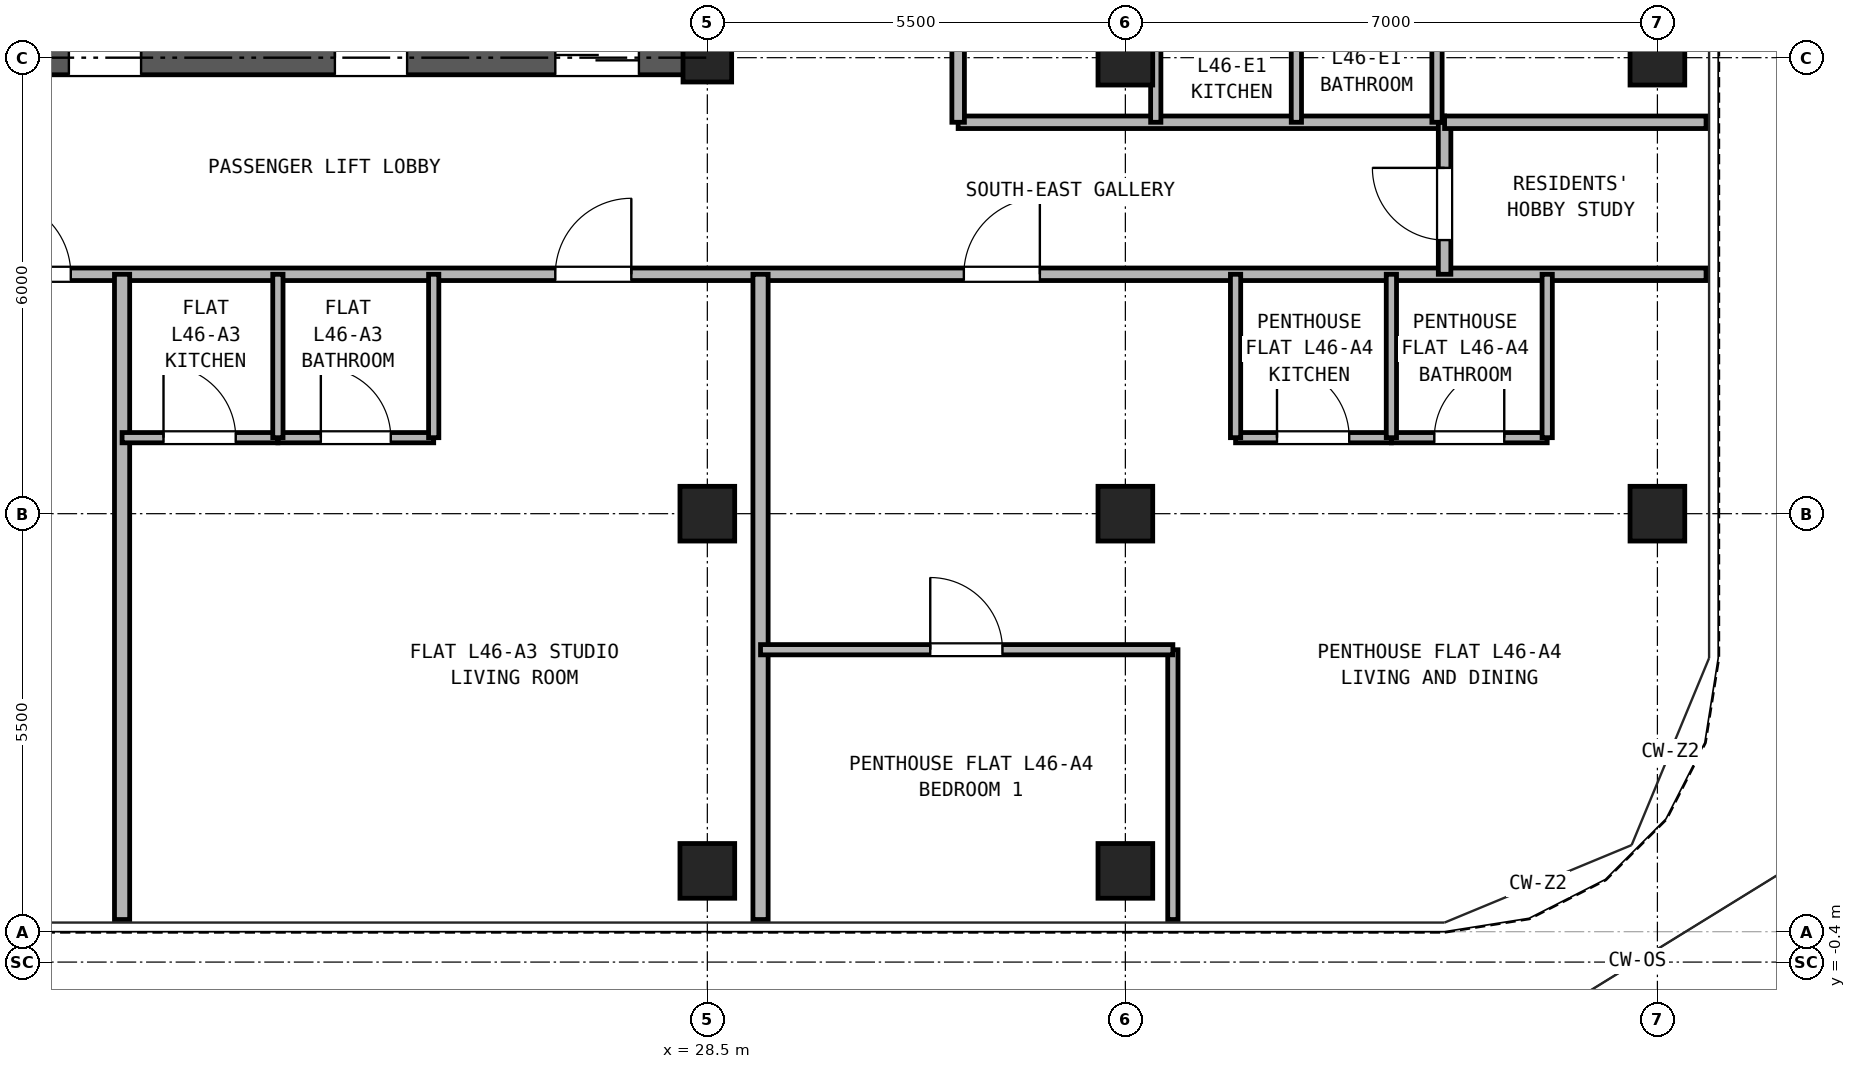
"""IFC4 building model, lengths in metres.
Left out: names, types, materials, properties, quantities, classifications, styles, units other than length and angle.
Written with IfcOpenShell. Run it as: python <this file> out.ifc"""

import sys

from ifc_helpers import new_model, si_unit, direction, frame, frame_2d, origin, origin_2d, place, context, subcontext, project, spatial, rectangle, hollow_rectangle, extrude, source, transform, mapped, element, fill, save


model = new_model("IFC4")
c1 = context("Model", 3, precision=1e-05, world=origin(), true_north=direction((0.0, 1.0)))
c2 = subcontext(c1, "Body", "Model", "MODEL_VIEW")
j1 = project(units=[si_unit("LENGTHUNIT", "METRE"), si_unit("PLANEANGLEUNIT", "RADIAN")], contexts=[c1])
p1 = place(None, origin())
s1 = spatial("IfcSite", under=j1, at=p1, CompositionType="ELEMENT")
p2 = place(p1, origin())
s2 = spatial("IfcBuilding", under=s1, at=p2, CompositionType="ELEMENT")
p3 = place(p2, frame((0.0, 0.0, 165.7)))
s3 = spatial("IfcBuildingStorey", under=s2, at=p3, CompositionType="ELEMENT", Elevation=165.7)
m1 = source(origin(), c2, "Body", "SweptSolid", [
    extrude(hollow_rectangle(XDim=0.72, YDim=0.72, WallThickness=0.04, at=origin_2d()), origin(), (0.0, 0.0, 1.0), 2.95),
])
for number, where, z_axis, x_axis in (
    (1, (28.5, 0.8, 0.0), (0.0, 0.0, 1.0), (1.0, 0.0, 0.0)),
    (2, (34.0, 0.8, 0.0), (0.0, 0.0, 1.0), (1.0, 0.0, 0.0)),
    (3, (41.0, 5.5, 0.0), (0.0, 0.0, 1.0), (1.0, 0.0, 0.0)),
    (4, (41.0, 11.5, 0.0), (0.0, 0.0, 1.0), (1.0, 0.0, 0.0)),
    (5, (28.5, 5.5, 0.0), (0.0, 0.0, 1.0), (1.0, 0.0, 0.0)),
):
    element("IfcColumn", number, at=place(p3, frame(where, z_axis=z_axis, x_axis=x_axis)), inside=s3, PredefinedType="COLUMN", context=c2, shape_type="MappedRepresentation", body=[
        mapped(m1, transform((0.0, 0.0, 0.0), x_axis=(1.0, 0.0, 0.0), y_axis=(0.0, 1.0, 0.0), z_axis=(0.0, 0.0, 1.0), scale=1.0)),
    ])
m2 = source(origin(), c2, "Body", "SweptSolid", [
    extrude(hollow_rectangle(XDim=0.64, YDim=0.64, WallThickness=0.035, at=origin_2d()), origin(), (0.0, 0.0, 1.0), 2.95),
])
p4 = place(p3, frame((28.5, 11.5, 0.0), z_axis=(0.0, 0.0, 1.0), x_axis=(1.0, 0.0, 0.0)))
e6 = element("IfcColumn", 6, at=p4, inside=s3, PredefinedType="COLUMN", context=c2, shape_type="MappedRepresentation", body=[
    mapped(m2, transform((0.0, 0.0, 0.0), x_axis=(1.0, 0.0, 0.0), y_axis=(0.0, 1.0, 0.0), z_axis=(0.0, 0.0, 1.0), scale=1.0)),
])
for number, where, z_axis, x_axis in (
    (7, (34.0, 5.5, 0.0), (0.0, 0.0, 1.0), (1.0, 0.0, 0.0)),
    (8, (34.0, 11.5, 0.0), (0.0, 0.0, 1.0), (1.0, 0.0, 0.0)),
):
    element("IfcColumn", number, at=place(p3, frame(where, z_axis=z_axis, x_axis=x_axis)), inside=s3, PredefinedType="COLUMN", context=c2, shape_type="MappedRepresentation", body=[
        mapped(m1, transform((0.0, 0.0, 0.0), x_axis=(1.0, 0.0, 0.0), y_axis=(0.0, 1.0, 0.0), z_axis=(0.0, 0.0, 1.0), scale=1.0)),
    ])
p5 = place(p3, frame((18.275, 11.5, 0.0), z_axis=(0.0, 0.0, 1.0), x_axis=(1.0, 0.0, 0.0)))
e9 = element("IfcWall", 9, at=p5, inside=s3, PredefinedType="SHEAR", context=c2, shape_type="SweptSolid", body=[
    extrude(rectangle(XDim=10.45, YDim=0.45, at=frame_2d((5.225, 0.0))), origin(), (0.0, 0.0, 1.0), 2.95),
])
p6 = place(p5, frame((1.825, 0.0, 0.0)))
e10 = element("IfcOpeningElement", 10, at=p6, cuts=e9, PredefinedType="OPENING", context=c2, shape_type="SweptSolid", body=[
    extrude(rectangle(XDim=0.95, YDim=2.15, at=frame_2d((0.475, 1.075))), frame((0.0, 0.235, 0.0), z_axis=(0.0, -1.0, 0.0), x_axis=(1.0, 0.0, 0.0)), (0.0, 0.0, 1.0), 0.47),
])
p7 = place(p5, frame((5.325, 0.0, 0.0)))
e11 = element("IfcOpeningElement", 11, at=p7, cuts=e9, PredefinedType="OPENING", context=c2, shape_type="SweptSolid", body=[
    extrude(rectangle(XDim=0.95, YDim=2.15, at=frame_2d((0.475, 1.075))), frame((0.0, 0.235, 0.0), z_axis=(0.0, -1.0, 0.0), x_axis=(1.0, 0.0, 0.0)), (0.0, 0.0, 1.0), 0.47),
])
p8 = place(p5, frame((8.225, 0.0, 0.0)))
e12 = element("IfcOpeningElement", 12, at=p8, cuts=e9, PredefinedType="OPENING", context=c2, shape_type="SweptSolid", body=[
    extrude(rectangle(XDim=1.1, YDim=2.25, at=frame_2d((0.55, 1.125))), frame((0.0, 0.235, 0.0), z_axis=(0.0, -1.0, 0.0), x_axis=(1.0, 0.0, 0.0)), (0.0, 0.0, 1.0), 0.47),
])
p9 = place(p3, frame((0.16, 8.65, 0.0), z_axis=(0.0, 0.0, 1.0), x_axis=(1.0, 0.0, 0.0)))
e13 = element("IfcWall", 13, at=p9, inside=s3, PredefinedType="PARTITIONING", context=c2, shape_type="SweptSolid", body=[
    extrude(rectangle(XDim=41.48, YDim=0.165, at=frame_2d((20.74, 0.0))), origin(), (0.0, 0.0, 1.0), 2.583),
])
p10 = place(p9, frame((9.39, 0.0, 0.0)))
e14 = element("IfcOpeningElement", 14, at=p10, cuts=e13, PredefinedType="OPENING", context=c2, shape_type="SweptSolid", body=[
    extrude(rectangle(XDim=1.0, YDim=2.15, at=frame_2d((0.5, 1.075))), frame((0.0, 0.093, 0.0), z_axis=(0.0, -1.0, 0.0), x_axis=(1.0, 0.0, 0.0)), (0.0, 0.0, 1.0), 0.185),
])
p11 = place(p9, frame((18.965, 0.0, 0.0)))
e15 = element("IfcOpeningElement", 15, at=p11, cuts=e13, PredefinedType="OPENING", context=c2, shape_type="SweptSolid", body=[
    extrude(rectangle(XDim=1.0, YDim=2.15, at=frame_2d((0.5, 1.075))), frame((0.0, 0.093, 0.0), z_axis=(0.0, -1.0, 0.0), x_axis=(1.0, 0.0, 0.0)), (0.0, 0.0, 1.0), 0.185),
])
p12 = place(p9, frame((26.34, 0.0, 0.0)))
e16 = element("IfcOpeningElement", 16, at=p12, cuts=e13, PredefinedType="OPENING", context=c2, shape_type="SweptSolid", body=[
    extrude(rectangle(XDim=1.0, YDim=2.15, at=frame_2d((0.5, 1.075))), frame((0.0, 0.093, 0.0), z_axis=(0.0, -1.0, 0.0), x_axis=(1.0, 0.0, 0.0)), (0.0, 0.0, 1.0), 0.185),
])
p13 = place(p9, frame((31.715, 0.0, 0.0)))
e17 = element("IfcOpeningElement", 17, at=p13, cuts=e13, PredefinedType="OPENING", context=c2, shape_type="SweptSolid", body=[
    extrude(rectangle(XDim=1.0, YDim=2.15, at=frame_2d((0.5, 1.075))), frame((0.0, 0.093, 0.0), z_axis=(0.0, -1.0, 0.0), x_axis=(1.0, 0.0, 0.0)), (0.0, 0.0, 1.0), 0.185),
])
p14 = place(p3, frame((31.8, 10.65, 0.0), z_axis=(0.0, 0.0, 1.0), x_axis=(1.0, 0.0, 0.0)))
e18 = element("IfcWall", 18, at=p14, inside=s3, PredefinedType="PARTITIONING", context=c2, shape_type="SweptSolid", body=[
    extrude(rectangle(XDim=6.4, YDim=0.165, at=frame_2d((3.2, 0.0))), origin(), (0.0, 0.0, 1.0), 2.95),
])
p15 = place(p3, frame((38.2, 8.65, 0.0), z_axis=(0.0, 0.0, 1.0), x_axis=(0.0, 1.0, 0.0)))
e19 = element("IfcWall", 19, at=p15, inside=s3, PredefinedType="PARTITIONING", context=c2, shape_type="SweptSolid", body=[
    extrude(rectangle(XDim=2.0, YDim=0.165, at=frame_2d((1.0, 0.0))), origin(), (0.0, 0.0, 1.0), 2.95),
])
p16 = place(p15, frame((0.45, 0.0, 0.0)))
e20 = element("IfcOpeningElement", 20, at=p16, cuts=e19, PredefinedType="OPENING", context=c2, shape_type="SweptSolid", body=[
    extrude(rectangle(XDim=0.95, YDim=2.15, at=frame_2d((0.475, 1.075))), frame((0.0, 0.093, 0.0), z_axis=(0.0, -1.0, 0.0), x_axis=(1.0, 0.0, 0.0)), (0.0, 0.0, 1.0), 0.185),
])
p17 = place(p3, frame((31.8, 10.65, 0.0), z_axis=(0.0, 0.0, 1.0), x_axis=(0.0, 1.0, 0.0)))
e21 = element("IfcWall", 21, at=p17, inside=s3, PredefinedType="PARTITIONING", context=c2, shape_type="SweptSolid", body=[
    extrude(rectangle(XDim=24.49, YDim=0.165, at=frame_2d((12.245, 0.0))), origin(), (0.0, 0.0, 1.0), 2.95),
])
p18 = place(p17, frame((3.425, 0.0, 0.0)))
e22 = element("IfcOpeningElement", 22, at=p18, cuts=e21, PredefinedType="OPENING", context=c2, shape_type="SweptSolid", body=[
    extrude(rectangle(XDim=1.0, YDim=2.15, at=frame_2d((0.5, 1.075))), frame((0.0, 0.093, 0.0), z_axis=(0.0, -1.0, 0.0), x_axis=(1.0, 0.0, 0.0)), (0.0, 0.0, 1.0), 0.185),
])
p19 = place(p17, frame((11.6, 0.0, 0.0)))
e23 = element("IfcOpeningElement", 23, at=p19, cuts=e21, PredefinedType="OPENING", context=c2, shape_type="SweptSolid", body=[
    extrude(rectangle(XDim=1.0, YDim=2.15, at=frame_2d((0.5, 1.075))), frame((0.0, 0.093, 0.0), z_axis=(0.0, -1.0, 0.0), x_axis=(1.0, 0.0, 0.0)), (0.0, 0.0, 1.0), 0.185),
])
p20 = place(p17, frame((18.25, 0.0, 0.0)))
e24 = element("IfcOpeningElement", 24, at=p20, cuts=e21, PredefinedType="OPENING", context=c2, shape_type="SweptSolid", body=[
    extrude(rectangle(XDim=1.0, YDim=2.15, at=frame_2d((0.5, 1.075))), frame((0.0, 0.093, 0.0), z_axis=(0.0, -1.0, 0.0), x_axis=(1.0, 0.0, 0.0)), (0.0, 0.0, 1.0), 0.185),
])
p21 = place(p3, frame((20.8, 0.16, 0.0), z_axis=(0.0, 0.0, 1.0), x_axis=(0.0, 1.0, 0.0)))
e25 = element("IfcWall", 25, at=p21, inside=s3, PredefinedType="PARTITIONING", context=c2, shape_type="SweptSolid", body=[
    extrude(rectangle(XDim=8.49, YDim=0.2, at=frame_2d((4.245, 0.0))), origin(), (0.0, 0.0, 1.0), 2.95),
])
p22 = place(p3, frame((20.8, 6.5, 0.0), z_axis=(0.0, 0.0, 1.0), x_axis=(1.0, 0.0, 0.0)))
e26 = element("IfcWall", 26, at=p22, inside=s3, PredefinedType="PARTITIONING", context=c2, shape_type="SweptSolid", body=[
    extrude(rectangle(XDim=2.05, YDim=0.135, at=frame_2d((1.025, 0.0))), origin(), (0.0, 0.0, 1.0), 2.95),
])
p23 = place(p22, frame((0.545, 0.0, 0.0)))
e27 = element("IfcOpeningElement", 27, at=p23, cuts=e26, PredefinedType="OPENING", context=c2, shape_type="SweptSolid", body=[
    extrude(rectangle(XDim=0.95, YDim=2.15, at=frame_2d((0.475, 1.075))), frame((0.0, 0.077, 0.0), z_axis=(0.0, -1.0, 0.0), x_axis=(1.0, 0.0, 0.0)), (0.0, 0.0, 1.0), 0.155),
])
p24 = place(p3, frame((22.85, 6.5, 0.0), z_axis=(0.0, 0.0, 1.0), x_axis=(1.0, 0.0, 0.0)))
e28 = element("IfcWall", 28, at=p24, inside=s3, PredefinedType="PARTITIONING", context=c2, shape_type="SweptSolid", body=[
    extrude(rectangle(XDim=2.05, YDim=0.135, at=frame_2d((1.025, 0.0))), origin(), (0.0, 0.0, 1.0), 2.95),
])
p25 = place(p24, frame((0.565, 0.0, 0.0)))
e29 = element("IfcOpeningElement", 29, at=p25, cuts=e28, PredefinedType="OPENING", context=c2, shape_type="SweptSolid", body=[
    extrude(rectangle(XDim=0.92, YDim=2.1, at=frame_2d((0.46, 1.05))), frame((0.0, 0.077, 0.0), z_axis=(0.0, -1.0, 0.0), x_axis=(1.0, 0.0, 0.0)), (0.0, 0.0, 1.0), 0.155),
])
for number, where, z_axis, x_axis in (
    (30, (22.85, 6.5, 0.0), (0.0, 0.0, 1.0), (0.0, 1.0, 0.0)),
    (31, (24.9, 6.5, 0.0), (0.0, 0.0, 1.0), (0.0, 1.0, 0.0)),
):
    element("IfcWall", number, at=place(p3, frame(where, z_axis=z_axis, x_axis=x_axis)), inside=s3, PredefinedType="PARTITIONING", context=c2, shape_type="SweptSolid", body=[
        extrude(rectangle(XDim=2.15, YDim=0.135, at=frame_2d((1.075, 0.0))), origin(), (0.0, 0.0, 1.0), 2.95),
    ])
p26 = place(p3, frame((29.2, 0.16, 0.0), z_axis=(0.0, 0.0, 1.0), x_axis=(0.0, 1.0, 0.0)))
e32 = element("IfcWall", 32, at=p26, inside=s3, PredefinedType="PARTITIONING", context=c2, shape_type="SweptSolid", body=[
    extrude(rectangle(XDim=8.49, YDim=0.2, at=frame_2d((4.245, 0.0))), origin(), (0.0, 0.0, 1.0), 2.95),
])
p27 = place(p3, frame((35.45, 6.5, 0.0), z_axis=(0.0, 0.0, 1.0), x_axis=(1.0, 0.0, 0.0)))
e33 = element("IfcWall", 33, at=p27, inside=s3, PredefinedType="PARTITIONING", context=c2, shape_type="SweptSolid", body=[
    extrude(rectangle(XDim=2.05, YDim=0.135, at=frame_2d((1.025, 0.0))), origin(), (0.0, 0.0, 1.0), 2.95),
])
p28 = place(p27, frame((0.545, 0.0, 0.0)))
e34 = element("IfcOpeningElement", 34, at=p28, cuts=e33, PredefinedType="OPENING", context=c2, shape_type="SweptSolid", body=[
    extrude(rectangle(XDim=0.95, YDim=2.15, at=frame_2d((0.475, 1.075))), frame((0.0, 0.077, 0.0), z_axis=(0.0, -1.0, 0.0), x_axis=(1.0, 0.0, 0.0)), (0.0, 0.0, 1.0), 0.155),
])
p29 = place(p3, frame((37.5, 6.5, 0.0), z_axis=(0.0, 0.0, 1.0), x_axis=(1.0, 0.0, 0.0)))
e35 = element("IfcWall", 35, at=p29, inside=s3, PredefinedType="PARTITIONING", context=c2, shape_type="SweptSolid", body=[
    extrude(rectangle(XDim=2.05, YDim=0.135, at=frame_2d((1.025, 0.0))), origin(), (0.0, 0.0, 1.0), 2.95),
])
p30 = place(p29, frame((0.565, 0.0, 0.0)))
e36 = element("IfcOpeningElement", 36, at=p30, cuts=e35, PredefinedType="OPENING", context=c2, shape_type="SweptSolid", body=[
    extrude(rectangle(XDim=0.92, YDim=2.1, at=frame_2d((0.46, 1.05))), frame((0.0, 0.077, 0.0), z_axis=(0.0, -1.0, 0.0), x_axis=(1.0, 0.0, 0.0)), (0.0, 0.0, 1.0), 0.155),
])
for number, where, z_axis, x_axis in (
    (37, (35.45, 6.5, 0.0), (0.0, 0.0, 1.0), (0.0, 1.0, 0.0)),
    (38, (37.5, 6.5, 0.0), (0.0, 0.0, 1.0), (0.0, 1.0, 0.0)),
    (39, (39.55, 6.5, 0.0), (0.0, 0.0, 1.0), (0.0, 1.0, 0.0)),
):
    element("IfcWall", number, at=place(p3, frame(where, z_axis=z_axis, x_axis=x_axis)), inside=s3, PredefinedType="PARTITIONING", context=c2, shape_type="SweptSolid", body=[
        extrude(rectangle(XDim=2.15, YDim=0.135, at=frame_2d((1.075, 0.0))), origin(), (0.0, 0.0, 1.0), 2.95),
    ])
p31 = place(p3, frame((34.625, 0.16, 0.0), z_axis=(0.0, 0.0, 1.0), x_axis=(0.0, 1.0, 0.0)))
e40 = element("IfcWall", 40, at=p31, inside=s3, PredefinedType="PARTITIONING", context=c2, shape_type="SweptSolid", body=[
    extrude(rectangle(XDim=3.55, YDim=0.135, at=frame_2d((1.775, 0.0))), origin(), (0.0, 0.0, 1.0), 2.95),
])
p32 = place(p3, frame((29.2, 3.71, 0.0), z_axis=(0.0, 0.0, 1.0), x_axis=(1.0, 0.0, 0.0)))
e41 = element("IfcWall", 41, at=p32, inside=s3, PredefinedType="PARTITIONING", context=c2, shape_type="SweptSolid", body=[
    extrude(rectangle(XDim=5.425, YDim=0.135, at=frame_2d((2.712, 0.0))), origin(), (0.0, 0.0, 1.0), 2.95),
])
p33 = place(p32, frame((2.233, 0.0, 0.0)))
e42 = element("IfcOpeningElement", 42, at=p33, cuts=e41, PredefinedType="OPENING", context=c2, shape_type="SweptSolid", body=[
    extrude(rectangle(XDim=0.95, YDim=2.15, at=frame_2d((0.475, 1.075))), frame((0.0, 0.077, 0.0), z_axis=(0.0, -1.0, 0.0), x_axis=(1.0, 0.0, 0.0)), (0.0, 0.0, 1.0), 0.155),
])
p34 = place(p3, frame((38.2, 10.65, 0.0), z_axis=(0.0, 0.0, 1.0), x_axis=(1.0, 0.0, 0.0)))
e43 = element("IfcWall", 43, at=p34, inside=s3, PredefinedType="PARTITIONING", context=c2, shape_type="SweptSolid", body=[
    extrude(rectangle(XDim=3.44, YDim=0.165, at=frame_2d((1.72, 0.0))), origin(), (0.0, 0.0, 1.0), 2.95),
])
for number, where, z_axis, x_axis in (
    (44, (34.4, 10.65, 0.0), (0.0, 0.0, 1.0), (0.0, 1.0, 0.0)),
    (45, (36.25, 10.65, 0.0), (0.0, 0.0, 1.0), (0.0, 1.0, 0.0)),
    (46, (38.1, 10.65, 0.0), (0.0, 0.0, 1.0), (0.0, 1.0, 0.0)),
):
    element("IfcWall", number, at=place(p3, frame(where, z_axis=z_axis, x_axis=x_axis)), inside=s3, PredefinedType="PARTITIONING", context=c2, shape_type="SweptSolid", body=[
        extrude(rectangle(XDim=2.15, YDim=0.135, at=frame_2d((1.075, 0.0))), origin(), (0.0, 0.0, 1.0), 2.95),
    ])
p35 = place(p6, frame((0.95, 0.0, 0.0), z_axis=(0.0, 0.0, 1.0), x_axis=(-1.0, 0.0, 0.0)))
e47 = element("IfcDoor", 47, at=p35, inside=s3, OperationType="SINGLE_SWING_RIGHT", PredefinedType="DOOR", context=c2, shape_type="SweptSolid", body=[
    extrude(rectangle(XDim=0.95, YDim=2.15, at=frame_2d((0.475, 1.075))), frame((0.0, 0.025, 0.0), z_axis=(0.0, -1.0, 0.0), x_axis=(1.0, 0.0, 0.0)), (0.0, 0.0, 1.0), 0.05),
])
fill(e10, e47)
p36 = place(p7, frame((0.95, 0.0, 0.0), z_axis=(0.0, 0.0, 1.0), x_axis=(-1.0, 0.0, 0.0)))
e48 = element("IfcDoor", 48, at=p36, inside=s3, OperationType="SINGLE_SWING_LEFT", PredefinedType="DOOR", context=c2, shape_type="SweptSolid", body=[
    extrude(rectangle(XDim=0.95, YDim=2.15, at=frame_2d((0.475, 1.075))), frame((0.0, 0.025, 0.0), z_axis=(0.0, -1.0, 0.0), x_axis=(1.0, 0.0, 0.0)), (0.0, 0.0, 1.0), 0.05),
])
fill(e11, e48)
p37 = place(p8, frame((1.1, 0.0, 0.0), z_axis=(0.0, 0.0, 1.0), x_axis=(-1.0, 0.0, 0.0)))
e49 = element("IfcDoor", 49, at=p37, inside=s3, OperationType="DOUBLE_DOOR_SLIDING", PredefinedType="DOOR", context=c2, shape_type="SweptSolid", body=[
    extrude(rectangle(XDim=1.1, YDim=2.25, at=frame_2d((0.55, 1.125))), frame((0.0, 0.025, 0.0), z_axis=(0.0, -1.0, 0.0), x_axis=(1.0, 0.0, 0.0)), (0.0, 0.0, 1.0), 0.05),
])
fill(e12, e49)
p38 = place(p11, frame((1.0, 0.0, 0.0), z_axis=(0.0, 0.0, 1.0), x_axis=(-1.0, 0.0, 0.0)))
e50 = element("IfcDoor", 50, at=p38, inside=s3, OperationType="SINGLE_SWING_LEFT", PredefinedType="DOOR", context=c2, shape_type="SweptSolid", body=[
    extrude(rectangle(XDim=1.0, YDim=2.15, at=frame_2d((0.5, 1.075))), frame((0.0, 0.025, 0.0), z_axis=(0.0, -1.0, 0.0), x_axis=(1.0, 0.0, 0.0)), (0.0, 0.0, 1.0), 0.05),
])
fill(e15, e50)
p39 = place(p23, origin())
e51 = element("IfcDoor", 51, at=p39, inside=s3, OperationType="SINGLE_SWING_LEFT", PredefinedType="DOOR", context=c2, shape_type="SweptSolid", body=[
    extrude(rectangle(XDim=0.95, YDim=2.15, at=frame_2d((0.475, 1.075))), frame((0.0, 0.025, 0.0), z_axis=(0.0, -1.0, 0.0), x_axis=(1.0, 0.0, 0.0)), (0.0, 0.0, 1.0), 0.05),
])
fill(e27, e51)
p40 = place(p25, origin())
e52 = element("IfcDoor", 52, at=p40, inside=s3, OperationType="SINGLE_SWING_LEFT", PredefinedType="DOOR", context=c2, shape_type="SweptSolid", body=[
    extrude(rectangle(XDim=0.92, YDim=2.1, at=frame_2d((0.46, 1.05))), frame((0.0, 0.025, 0.0), z_axis=(0.0, -1.0, 0.0), x_axis=(1.0, 0.0, 0.0)), (0.0, 0.0, 1.0), 0.05),
])
fill(e29, e52)
p41 = place(p12, frame((1.0, 0.0, 0.0), z_axis=(0.0, 0.0, 1.0), x_axis=(-1.0, 0.0, 0.0)))
e53 = element("IfcDoor", 53, at=p41, inside=s3, OperationType="SINGLE_SWING_RIGHT", PredefinedType="DOOR", context=c2, shape_type="SweptSolid", body=[
    extrude(rectangle(XDim=1.0, YDim=2.15, at=frame_2d((0.5, 1.075))), frame((0.0, 0.025, 0.0), z_axis=(0.0, -1.0, 0.0), x_axis=(1.0, 0.0, 0.0)), (0.0, 0.0, 1.0), 0.05),
])
fill(e16, e53)
p42 = place(p28, origin())
e54 = element("IfcDoor", 54, at=p42, inside=s3, OperationType="SINGLE_SWING_LEFT", PredefinedType="DOOR", context=c2, shape_type="SweptSolid", body=[
    extrude(rectangle(XDim=0.95, YDim=2.15, at=frame_2d((0.475, 1.075))), frame((0.0, 0.025, 0.0), z_axis=(0.0, -1.0, 0.0), x_axis=(1.0, 0.0, 0.0)), (0.0, 0.0, 1.0), 0.05),
])
fill(e34, e54)
p43 = place(p30, origin())
e55 = element("IfcDoor", 55, at=p43, inside=s3, OperationType="SINGLE_SWING_RIGHT", PredefinedType="DOOR", context=c2, shape_type="SweptSolid", body=[
    extrude(rectangle(XDim=0.92, YDim=2.1, at=frame_2d((0.46, 1.05))), frame((0.0, 0.025, 0.0), z_axis=(0.0, -1.0, 0.0), x_axis=(1.0, 0.0, 0.0)), (0.0, 0.0, 1.0), 0.05),
])
fill(e36, e55)
p44 = place(p33, frame((0.95, 0.0, 0.0), z_axis=(0.0, 0.0, 1.0), x_axis=(-1.0, 0.0, 0.0)))
e56 = element("IfcDoor", 56, at=p44, inside=s3, OperationType="SINGLE_SWING_LEFT", PredefinedType="DOOR", context=c2, shape_type="SweptSolid", body=[
    extrude(rectangle(XDim=0.95, YDim=2.15, at=frame_2d((0.475, 1.075))), frame((0.0, 0.025, 0.0), z_axis=(0.0, -1.0, 0.0), x_axis=(1.0, 0.0, 0.0)), (0.0, 0.0, 1.0), 0.05),
])
fill(e42, e56)
p45 = place(p13, frame((1.0, 0.0, 0.0), z_axis=(0.0, 0.0, 1.0), x_axis=(-1.0, 0.0, 0.0)))
e57 = element("IfcDoor", 57, at=p45, inside=s3, OperationType="SINGLE_SWING_RIGHT", PredefinedType="DOOR", context=c2, shape_type="SweptSolid", body=[
    extrude(rectangle(XDim=1.0, YDim=2.15, at=frame_2d((0.5, 1.075))), frame((0.0, 0.025, 0.0), z_axis=(0.0, -1.0, 0.0), x_axis=(1.0, 0.0, 0.0)), (0.0, 0.0, 1.0), 0.05),
])
fill(e17, e57)
p46 = place(p16, origin())
e58 = element("IfcDoor", 58, at=p46, inside=s3, OperationType="SINGLE_SWING_RIGHT", PredefinedType="DOOR", context=c2, shape_type="SweptSolid", body=[
    extrude(rectangle(XDim=0.95, YDim=2.15, at=frame_2d((0.475, 1.075))), frame((0.0, 0.025, 0.0), z_axis=(0.0, -1.0, 0.0), x_axis=(1.0, 0.0, 0.0)), (0.0, 0.0, 1.0), 0.05),
])
fill(e20, e58)
save(model, sys.argv[1])
